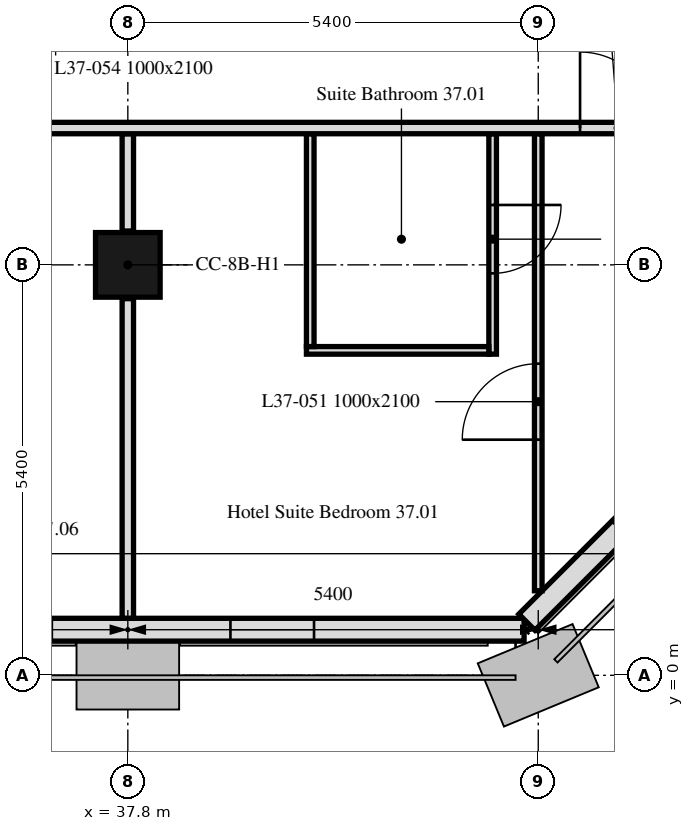
"""IFC4 building model, lengths in metres.
Left out: names, types, materials, properties, quantities, classifications, styles, units other than length and angle.
Written with IfcOpenShell. Run it as: python <this file> out.ifc"""

import sys

from ifc_helpers import new_model, si_unit, direction, frame, frame_2d, origin, origin_2d, place, context, subcontext, project, spatial, rectangle, extrude, element, fill, save


model = new_model("IFC4")
c1 = context("Model", 3, precision=1e-05, world=origin(), true_north=direction((0.0, 1.0)))
c2 = subcontext(c1, "Body", "Model", "MODEL_VIEW")
j1 = project(units=[si_unit("LENGTHUNIT", "METRE"), si_unit("PLANEANGLEUNIT", "RADIAN")], contexts=[c1])
p1 = place(None, origin())
s1 = spatial("IfcSite", under=j1, at=p1, CompositionType="ELEMENT")
p2 = place(p1, origin())
s2 = spatial("IfcBuilding", under=s1, at=p2, CompositionType="ELEMENT")
p3 = place(p2, frame((0.0, 0.0, 159.4)))
s3 = spatial("IfcBuildingStorey", under=s2, at=p3, CompositionType="ELEMENT", Elevation=159.4)
p4 = place(p3, frame((37.8, 5.4, 0.0), z_axis=(0.0, 0.0, 1.0), x_axis=(1.0, 0.0, 0.0)))
e1 = element("IfcColumn", 1, at=p4, inside=s3, PredefinedType="COLUMN", context=c2, shape_type="SweptSolid", body=[
    extrude(rectangle(XDim=0.85, YDim=0.85, at=origin_2d()), origin(), (0.0, 0.0, 1.0), 3.0),
])
p5 = place(p3, frame((10.986, 0.6, 0.0), z_axis=(0.0, 0.0, 1.0), x_axis=(1.0, 0.0, 0.0)))
e2 = element("IfcWall", 2, at=p5, inside=s3, PredefinedType="SOLIDWALL", context=c2, shape_type="SweptSolid", body=[
    extrude(rectangle(XDim=32.027, YDim=0.3, at=frame_2d((16.014, 0.0))), origin(), (0.0, 0.0, 1.0), 3.0),
])
p6 = place(p5, frame((0.814, 0.0, 0.9)))
e3 = element("IfcOpeningElement", 3, at=p6, cuts=e2, PredefinedType="OPENING", context=c2, shape_type="SweptSolid", body=[
    extrude(rectangle(XDim=3.4, YDim=1.7, at=frame_2d((1.7, 0.85))), frame((0.0, 0.16, 0.0), z_axis=(0.0, -1.0, 0.0), x_axis=(1.0, 0.0, 0.0)), (0.0, 0.0, 1.0), 0.32),
])
p7 = place(p5, frame((6.564, 0.0, 0.9)))
e4 = element("IfcOpeningElement", 4, at=p7, cuts=e2, PredefinedType="OPENING", context=c2, shape_type="SweptSolid", body=[
    extrude(rectangle(XDim=1.1, YDim=1.7, at=frame_2d((0.55, 0.85))), frame((0.0, 0.16, 0.0), z_axis=(0.0, -1.0, 0.0), x_axis=(1.0, 0.0, 0.0)), (0.0, 0.0, 1.0), 0.32),
])
p8 = place(p5, frame((11.614, 0.0, 0.9)))
e5 = element("IfcOpeningElement", 5, at=p8, cuts=e2, PredefinedType="OPENING", context=c2, shape_type="SweptSolid", body=[
    extrude(rectangle(XDim=3.4, YDim=1.7, at=frame_2d((1.7, 0.85))), frame((0.0, 0.16, 0.0), z_axis=(0.0, -1.0, 0.0), x_axis=(1.0, 0.0, 0.0)), (0.0, 0.0, 1.0), 0.32),
])
p9 = place(p5, frame((17.364, 0.0, 0.9)))
e6 = element("IfcOpeningElement", 6, at=p9, cuts=e2, PredefinedType="OPENING", context=c2, shape_type="SweptSolid", body=[
    extrude(rectangle(XDim=1.1, YDim=1.7, at=frame_2d((0.55, 0.85))), frame((0.0, 0.16, 0.0), z_axis=(0.0, -1.0, 0.0), x_axis=(1.0, 0.0, 0.0)), (0.0, 0.0, 1.0), 0.32),
])
p10 = place(p5, frame((22.414, 0.0, 0.9)))
e7 = element("IfcOpeningElement", 7, at=p10, cuts=e2, PredefinedType="OPENING", context=c2, shape_type="SweptSolid", body=[
    extrude(rectangle(XDim=3.4, YDim=1.7, at=frame_2d((1.7, 0.85))), frame((0.0, 0.16, 0.0), z_axis=(0.0, -1.0, 0.0), x_axis=(1.0, 0.0, 0.0)), (0.0, 0.0, 1.0), 0.32),
])
p11 = place(p5, frame((28.164, 0.0, 0.9)))
e8 = element("IfcOpeningElement", 8, at=p11, cuts=e2, PredefinedType="OPENING", context=c2, shape_type="SweptSolid", body=[
    extrude(rectangle(XDim=1.1, YDim=1.7, at=frame_2d((0.55, 0.85))), frame((0.0, 0.16, 0.0), z_axis=(0.0, -1.0, 0.0), x_axis=(1.0, 0.0, 0.0)), (0.0, 0.0, 1.0), 0.32),
])
p12 = place(p3, frame((43.051, 0.699, 0.0), z_axis=(0.0, 0.0, 1.0), x_axis=(0.707106781187, 0.707106781187, 0.0)))
e9 = element("IfcWall", 9, at=p12, inside=s3, PredefinedType="SOLIDWALL", context=c2, shape_type="SweptSolid", body=[
    extrude(rectangle(XDim=6.86, YDim=0.3, at=frame_2d((3.43, 0.0))), origin(), (0.0, 0.0, 1.0), 3.0),
])
p13 = place(p12, frame((1.73, 0.0, 0.9)))
e10 = element("IfcOpeningElement", 10, at=p13, cuts=e9, PredefinedType="OPENING", context=c2, shape_type="SweptSolid", body=[
    extrude(rectangle(XDim=3.4, YDim=1.7, at=frame_2d((1.7, 0.85))), frame((0.0, 0.16, 0.0), z_axis=(0.0, -1.0, 0.0), x_axis=(1.0, 0.0, 0.0)), (0.0, 0.0, 1.0), 0.32),
])
p14 = place(p3, frame((37.8, 0.751, 0.0), z_axis=(0.0, 0.0, 1.0), x_axis=(0.0, 1.0, 0.0)))
e11 = element("IfcWall", 11, at=p14, inside=s3, PredefinedType="PARTITIONING", context=c2, shape_type="SweptSolid", body=[
    extrude(rectangle(XDim=4.204, YDim=0.15, at=frame_2d((2.102, 0.0))), origin(), (0.0, 0.0, 1.0), 2.4),
])
p15 = place(p3, frame((37.8, 5.845, 0.0), z_axis=(0.0, 0.0, 1.0), x_axis=(0.0, 1.0, 0.0)))
e12 = element("IfcWall", 12, at=p15, inside=s3, PredefinedType="PARTITIONING", context=c2, shape_type="SweptSolid", body=[
    extrude(rectangle(XDim=1.28, YDim=0.15, at=frame_2d((0.64, 0.0))), origin(), (0.0, 0.0, 1.0), 2.4),
])
p16 = place(p3, frame((43.2, 1.112, 0.0), z_axis=(0.0, 0.0, 1.0), x_axis=(0.0, 1.0, 0.0)))
e13 = element("IfcWall", 13, at=p16, inside=s3, PredefinedType="PARTITIONING", context=c2, shape_type="SweptSolid", body=[
    extrude(rectangle(XDim=6.013, YDim=0.1, at=frame_2d((3.006, 0.0))), origin(), (0.0, 0.0, 1.0), 3.0),
])
p17 = place(p16, frame((1.988, 0.0, 0.0)))
e14 = element("IfcOpeningElement", 14, at=p17, cuts=e13, PredefinedType="OPENING", context=c2, shape_type="SweptSolid", body=[
    extrude(rectangle(XDim=1.0, YDim=2.1, at=frame_2d((0.5, 1.05))), frame((0.0, 0.05, 0.0), z_axis=(0.0, -1.0, 0.0), x_axis=(1.0, 0.0, 0.0)), (0.0, 0.0, 1.0), 0.1),
])
p18 = place(p3, frame((42.6, 7.125, 0.0), z_axis=(0.0, 0.0, 1.0), x_axis=(0.0, -1.0, 0.0)))
e15 = element("IfcWall", 15, at=p18, inside=s3, PredefinedType="PARTITIONING", context=c2, shape_type="SweptSolid", body=[
    extrude(rectangle(XDim=2.9, YDim=0.1, at=frame_2d((1.45, 0.0))), origin(), (0.0, 0.0, 1.0), 3.0),
])
p19 = place(p18, frame((0.937, 0.0, 0.0)))
e16 = element("IfcOpeningElement", 16, at=p19, cuts=e15, PredefinedType="OPENING", context=c2, shape_type="SweptSolid", body=[
    extrude(rectangle(XDim=0.9, YDim=2.1, at=frame_2d((0.45, 1.05))), frame((0.0, 0.05, 0.0), z_axis=(0.0, -1.0, 0.0), x_axis=(1.0, 0.0, 0.0)), (0.0, 0.0, 1.0), 0.1),
])
p20 = place(p3, frame((42.55, 4.275, 0.0), z_axis=(0.0, 0.0, 1.0), x_axis=(-1.0, 0.0, 0.0)))
e17 = element("IfcWall", 17, at=p20, inside=s3, PredefinedType="PARTITIONING", context=c2, shape_type="SweptSolid", body=[
    extrude(rectangle(XDim=2.4, YDim=0.1, at=frame_2d((1.2, 0.0))), origin(), (0.0, 0.0, 1.0), 3.0),
])
p21 = place(p3, frame((40.2, 4.325, 0.0), z_axis=(0.0, 0.0, 1.0), x_axis=(0.0, 1.0, 0.0)))
e18 = element("IfcWall", 18, at=p21, inside=s3, PredefinedType="PARTITIONING", context=c2, shape_type="SweptSolid", body=[
    extrude(rectangle(XDim=2.8, YDim=0.1, at=frame_2d((1.4, 0.0))), origin(), (0.0, 0.0, 1.0), 3.0),
])
p22 = place(p3, frame((6.151, 7.2, 0.0), z_axis=(0.0, 0.0, 1.0), x_axis=(1.0, 0.0, 0.0)))
e19 = element("IfcWall", 19, at=p22, inside=s3, PredefinedType="PARTITIONING", context=c2, shape_type="SweptSolid", body=[
    extrude(rectangle(XDim=41.698, YDim=0.15, at=frame_2d((20.849, 0.0))), origin(), (0.0, 0.0, 1.0), 2.4),
])
p23 = place(p22, frame((2.249, 0.0, 0.0)))
e20 = element("IfcOpeningElement", 20, at=p23, cuts=e19, PredefinedType="OPENING", context=c2, shape_type="SweptSolid", body=[
    extrude(rectangle(XDim=1.0, YDim=2.1, at=frame_2d((0.5, 1.05))), frame((0.0, 0.075, 0.0), z_axis=(0.0, -1.0, 0.0), x_axis=(1.0, 0.0, 0.0)), (0.0, 0.0, 1.0), 0.15),
])
p24 = place(p22, frame((7.649, 0.0, 0.0)))
e21 = element("IfcOpeningElement", 21, at=p24, cuts=e19, PredefinedType="OPENING", context=c2, shape_type="SweptSolid", body=[
    extrude(rectangle(XDim=1.0, YDim=2.1, at=frame_2d((0.5, 1.05))), frame((0.0, 0.075, 0.0), z_axis=(0.0, -1.0, 0.0), x_axis=(1.0, 0.0, 0.0)), (0.0, 0.0, 1.0), 0.15),
])
p25 = place(p22, frame((13.049, 0.0, 0.0)))
e22 = element("IfcOpeningElement", 22, at=p25, cuts=e19, PredefinedType="OPENING", context=c2, shape_type="SweptSolid", body=[
    extrude(rectangle(XDim=1.0, YDim=2.1, at=frame_2d((0.5, 1.05))), frame((0.0, 0.075, 0.0), z_axis=(0.0, -1.0, 0.0), x_axis=(1.0, 0.0, 0.0)), (0.0, 0.0, 1.0), 0.15),
])
p26 = place(p22, frame((18.449, 0.0, 0.0)))
e23 = element("IfcOpeningElement", 23, at=p26, cuts=e19, PredefinedType="OPENING", context=c2, shape_type="SweptSolid", body=[
    extrude(rectangle(XDim=1.0, YDim=2.1, at=frame_2d((0.5, 1.05))), frame((0.0, 0.075, 0.0), z_axis=(0.0, -1.0, 0.0), x_axis=(1.0, 0.0, 0.0)), (0.0, 0.0, 1.0), 0.15),
])
p27 = place(p22, frame((23.849, 0.0, 0.0)))
e24 = element("IfcOpeningElement", 24, at=p27, cuts=e19, PredefinedType="OPENING", context=c2, shape_type="SweptSolid", body=[
    extrude(rectangle(XDim=1.0, YDim=2.1, at=frame_2d((0.5, 1.05))), frame((0.0, 0.075, 0.0), z_axis=(0.0, -1.0, 0.0), x_axis=(1.0, 0.0, 0.0)), (0.0, 0.0, 1.0), 0.15),
])
p28 = place(p22, frame((29.249, 0.0, 0.0)))
e25 = element("IfcOpeningElement", 25, at=p28, cuts=e19, PredefinedType="OPENING", context=c2, shape_type="SweptSolid", body=[
    extrude(rectangle(XDim=1.0, YDim=2.1, at=frame_2d((0.5, 1.05))), frame((0.0, 0.075, 0.0), z_axis=(0.0, -1.0, 0.0), x_axis=(1.0, 0.0, 0.0)), (0.0, 0.0, 1.0), 0.15),
])
p29 = place(p22, frame((37.599, 0.0, 0.0)))
e26 = element("IfcOpeningElement", 26, at=p29, cuts=e19, PredefinedType="OPENING", context=c2, shape_type="SweptSolid", body=[
    extrude(rectangle(XDim=1.0, YDim=2.1, at=frame_2d((0.5, 1.05))), frame((0.0, 0.075, 0.0), z_axis=(0.0, -1.0, 0.0), x_axis=(1.0, 0.0, 0.0)), (0.0, 0.0, 1.0), 0.15),
])
p30 = place(p11, origin())
e27 = element("IfcWindow", 27, at=p30, inside=s3, PartitioningType="SINGLE_PANEL", PredefinedType="WINDOW", context=c2, shape_type="SweptSolid", body=[
    extrude(rectangle(XDim=1.1, YDim=1.7, at=frame_2d((0.55, 0.85))), frame((0.0, 0.03, 0.0), z_axis=(0.0, -1.0, 0.0), x_axis=(1.0, 0.0, 0.0)), (0.0, 0.0, 1.0), 0.06),
])
fill(e8, e27)
p31 = place(p19, origin())
e28 = element("IfcDoor", 28, at=p31, inside=s3, OperationType="SINGLE_SWING_RIGHT", PredefinedType="DOOR", context=c2, shape_type="SweptSolid", body=[
    extrude(rectangle(XDim=0.9, YDim=2.1, at=frame_2d((0.45, 1.05))), frame((0.0, 0.025, 0.0), z_axis=(0.0, -1.0, 0.0), x_axis=(1.0, 0.0, 0.0)), (0.0, 0.0, 1.0), 0.05),
])
fill(e16, e28)
p32 = place(p17, origin())
e29 = element("IfcDoor", 29, at=p32, inside=s3, OperationType="SINGLE_SWING_RIGHT", PredefinedType="DOOR", context=c2, shape_type="SweptSolid", body=[
    extrude(rectangle(XDim=1.0, YDim=2.1, at=frame_2d((0.5, 1.05))), frame((0.0, 0.025, 0.0), z_axis=(0.0, -1.0, 0.0), x_axis=(1.0, 0.0, 0.0)), (0.0, 0.0, 1.0), 0.05),
])
fill(e14, e29)
p33 = place(p29, origin())
e30 = element("IfcDoor", 30, at=p33, inside=s3, OperationType="SINGLE_SWING_LEFT", PredefinedType="DOOR", context=c2, shape_type="SweptSolid", body=[
    extrude(rectangle(XDim=1.0, YDim=2.1, at=frame_2d((0.5, 1.05))), frame((0.0, 0.025, 0.0), z_axis=(0.0, -1.0, 0.0), x_axis=(1.0, 0.0, 0.0)), (0.0, 0.0, 1.0), 0.05),
])
fill(e26, e30)
save(model, sys.argv[1])
